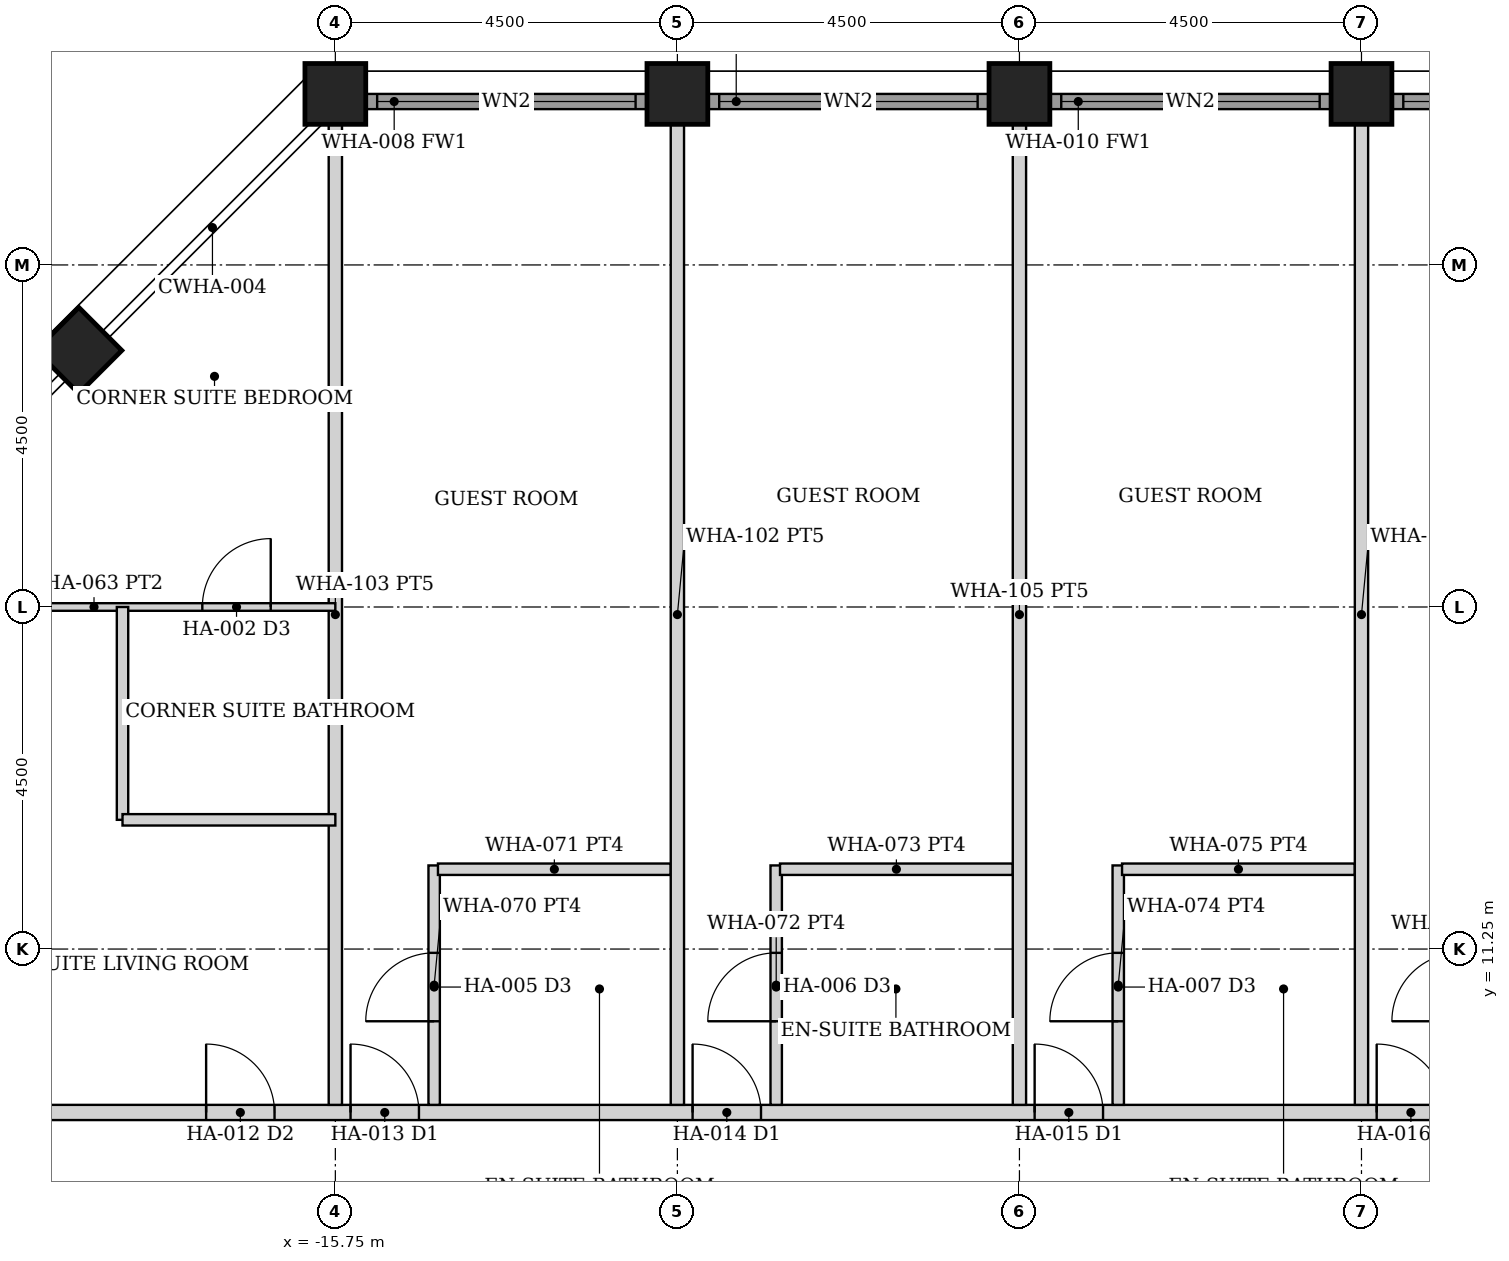
"""IFC4 building model, lengths in metres.
Left out: names, types, materials, properties, quantities, classifications, styles, units other than length and angle.
Written with IfcOpenShell. Run it as: python <this file> out.ifc"""

import sys

from ifc_helpers import new_model, si_unit, direction, frame, frame_2d, origin, origin_2d, place, context, subcontext, project, spatial, rectangle, hollow_rectangle, extrude, element, fill, save


model = new_model("IFC4")
c1 = context("Model", 3, precision=1e-05, world=origin(), true_north=direction((0.0, 1.0)))
c2 = subcontext(c1, "Body", "Model", "MODEL_VIEW")
j1 = project(units=[si_unit("LENGTHUNIT", "METRE"), si_unit("PLANEANGLEUNIT", "RADIAN")], contexts=[c1])
p1 = place(None, origin())
s1 = spatial("IfcSite", under=j1, at=p1, CompositionType="ELEMENT")
p2 = place(p1, origin())
s2 = spatial("IfcBuilding", under=s1, at=p2, CompositionType="ELEMENT")
p3 = place(p2, frame((0.0, 0.0, 118.4)))
s3 = spatial("IfcBuildingStorey", under=s2, at=p3, CompositionType="ELEMENT", Elevation=118.4)
for number, where, z_axis, x_axis in (
    (1, (-15.75, 22.5, 0.0), (0.0, 0.0, 1.0), (0.0, 1.0, 0.0)),
    (2, (-11.25, 22.5, 0.0), (0.0, 0.0, 1.0), (0.0, 1.0, 0.0)),
    (3, (-6.75, 22.5, 0.0), (0.0, 0.0, 1.0), (0.0, 1.0, 0.0)),
    (4, (-2.25, 22.5, 0.0), (0.0, 0.0, 1.0), (0.0, 1.0, 0.0)),
    (5, (-19.125, 19.125, 0.0), (0.0, 0.0, 1.0), (0.707, -0.707, 0.0)),
):
    element("IfcColumn", number, at=place(p3, frame(where, z_axis=z_axis, x_axis=x_axis)), inside=s3, PredefinedType="COLUMN", context=c2, shape_type="SweptSolid", body=[
        extrude(hollow_rectangle(XDim=0.8, YDim=0.8, WallThickness=0.06, at=origin_2d()), origin(), (0.0, 0.0, 1.0), 3.6),
    ])
p4 = place(p3, frame((-15.345, 22.4, 0.0), z_axis=(0.0, 0.0, 1.0), x_axis=(1.0, 0.0, 0.0)))
e6 = element("IfcWall", 6, at=p4, inside=s3, PredefinedType="SOLIDWALL", context=c2, shape_type="SweptSolid", body=[
    extrude(rectangle(XDim=3.69, YDim=0.2, at=frame_2d((1.845, 0.0))), origin(), (0.0, 0.0, 1.0), 2.479),
])
p5 = place(p4, frame((0.145, 0.0, 0.3)))
e7 = element("IfcOpeningElement", 7, at=p5, cuts=e6, PredefinedType="OPENING", context=c2, shape_type="SweptSolid", body=[
    extrude(rectangle(XDim=3.4, YDim=2.029, at=frame_2d((1.7, 1.015))), frame((0.0, 0.11, 0.0), z_axis=(0.0, -1.0, 0.0), x_axis=(1.0, 0.0, 0.0)), (0.0, 0.0, 1.0), 0.22),
])
p6 = place(p3, frame((-10.845, 22.4, 0.0), z_axis=(0.0, 0.0, 1.0), x_axis=(1.0, 0.0, 0.0)))
e8 = element("IfcWall", 8, at=p6, inside=s3, PredefinedType="SOLIDWALL", context=c2, shape_type="SweptSolid", body=[
    extrude(rectangle(XDim=3.69, YDim=0.2, at=frame_2d((1.845, 0.0))), origin(), (0.0, 0.0, 1.0), 2.479),
])
p7 = place(p6, frame((0.145, 0.0, 0.3)))
e9 = element("IfcOpeningElement", 9, at=p7, cuts=e8, PredefinedType="OPENING", context=c2, shape_type="SweptSolid", body=[
    extrude(rectangle(XDim=3.4, YDim=2.029, at=frame_2d((1.7, 1.015))), frame((0.0, 0.11, 0.0), z_axis=(0.0, -1.0, 0.0), x_axis=(1.0, 0.0, 0.0)), (0.0, 0.0, 1.0), 0.22),
])
p8 = place(p3, frame((-6.345, 22.4, 0.0), z_axis=(0.0, 0.0, 1.0), x_axis=(1.0, 0.0, 0.0)))
e10 = element("IfcWall", 10, at=p8, inside=s3, PredefinedType="SOLIDWALL", context=c2, shape_type="SweptSolid", body=[
    extrude(rectangle(XDim=3.69, YDim=0.2, at=frame_2d((1.845, 0.0))), origin(), (0.0, 0.0, 1.0), 2.479),
])
p9 = place(p8, frame((0.145, 0.0, 0.3)))
e11 = element("IfcOpeningElement", 11, at=p9, cuts=e10, PredefinedType="OPENING", context=c2, shape_type="SweptSolid", body=[
    extrude(rectangle(XDim=3.4, YDim=2.029, at=frame_2d((1.7, 1.015))), frame((0.0, 0.11, 0.0), z_axis=(0.0, -1.0, 0.0), x_axis=(1.0, 0.0, 0.0)), (0.0, 0.0, 1.0), 0.22),
])
p10 = place(p3, frame((-1.845, 22.4, 0.0), z_axis=(0.0, 0.0, 1.0), x_axis=(1.0, 0.0, 0.0)))
e12 = element("IfcWall", 12, at=p10, inside=s3, PredefinedType="SOLIDWALL", context=c2, shape_type="SweptSolid", body=[
    extrude(rectangle(XDim=3.69, YDim=0.2, at=frame_2d((1.845, 0.0))), origin(), (0.0, 0.0, 1.0), 2.479),
])
p11 = place(p10, frame((0.145, 0.0, 0.3)))
e13 = element("IfcOpeningElement", 13, at=p11, cuts=e12, PredefinedType="OPENING", context=c2, shape_type="SweptSolid", body=[
    extrude(rectangle(XDim=3.4, YDim=2.029, at=frame_2d((1.7, 1.015))), frame((0.0, 0.11, 0.0), z_axis=(0.0, -1.0, 0.0), x_axis=(1.0, 0.0, 0.0)), (0.0, 0.0, 1.0), 0.22),
])
p12 = place(p3, frame((-22.3, 9.1, 0.0), z_axis=(0.0, 0.0, 1.0), x_axis=(1.0, 0.0, 0.0)))
e14 = element("IfcWall", 14, at=p12, inside=s3, PredefinedType="PARTITIONING", context=c2, shape_type="SweptSolid", body=[
    extrude(rectangle(XDim=44.6, YDim=0.2, at=frame_2d((22.3, 0.0))), origin(), (0.0, 0.0, 1.0), 2.473),
])
p13 = place(p12, frame((6.75, 0.0, 0.0)))
e15 = element("IfcOpeningElement", 15, at=p13, cuts=e14, PredefinedType="OPENING", context=c2, shape_type="SweptSolid", body=[
    extrude(rectangle(XDim=0.9, YDim=2.1, at=frame_2d((0.45, 1.05))), frame((0.0, 0.11, 0.0), z_axis=(0.0, -1.0, 0.0), x_axis=(1.0, 0.0, 0.0)), (0.0, 0.0, 1.0), 0.22),
])
p14 = place(p12, frame((11.25, 0.0, 0.0)))
e16 = element("IfcOpeningElement", 16, at=p14, cuts=e14, PredefinedType="OPENING", context=c2, shape_type="SweptSolid", body=[
    extrude(rectangle(XDim=0.9, YDim=2.1, at=frame_2d((0.45, 1.05))), frame((0.0, 0.11, 0.0), z_axis=(0.0, -1.0, 0.0), x_axis=(1.0, 0.0, 0.0)), (0.0, 0.0, 1.0), 0.22),
])
p15 = place(p12, frame((15.75, 0.0, 0.0)))
e17 = element("IfcOpeningElement", 17, at=p15, cuts=e14, PredefinedType="OPENING", context=c2, shape_type="SweptSolid", body=[
    extrude(rectangle(XDim=0.9, YDim=2.1, at=frame_2d((0.45, 1.05))), frame((0.0, 0.11, 0.0), z_axis=(0.0, -1.0, 0.0), x_axis=(1.0, 0.0, 0.0)), (0.0, 0.0, 1.0), 0.22),
])
p16 = place(p12, frame((20.25, 0.0, 0.0)))
e18 = element("IfcOpeningElement", 18, at=p16, cuts=e14, PredefinedType="OPENING", context=c2, shape_type="SweptSolid", body=[
    extrude(rectangle(XDim=0.9, YDim=2.1, at=frame_2d((0.45, 1.05))), frame((0.0, 0.11, 0.0), z_axis=(0.0, -1.0, 0.0), x_axis=(1.0, 0.0, 0.0)), (0.0, 0.0, 1.0), 0.22),
])
p17 = place(p12, frame((24.75, 0.0, 0.0)))
e19 = element("IfcOpeningElement", 19, at=p17, cuts=e14, PredefinedType="OPENING", context=c2, shape_type="SweptSolid", body=[
    extrude(rectangle(XDim=0.9, YDim=2.1, at=frame_2d((0.45, 1.05))), frame((0.0, 0.11, 0.0), z_axis=(0.0, -1.0, 0.0), x_axis=(1.0, 0.0, 0.0)), (0.0, 0.0, 1.0), 0.22),
])
p18 = place(p12, frame((29.25, 0.0, 0.0)))
e20 = element("IfcOpeningElement", 20, at=p18, cuts=e14, PredefinedType="OPENING", context=c2, shape_type="SweptSolid", body=[
    extrude(rectangle(XDim=0.9, YDim=2.1, at=frame_2d((0.45, 1.05))), frame((0.0, 0.11, 0.0), z_axis=(0.0, -1.0, 0.0), x_axis=(1.0, 0.0, 0.0)), (0.0, 0.0, 1.0), 0.22),
])
p19 = place(p12, frame((33.75, 0.0, 0.0)))
e21 = element("IfcOpeningElement", 21, at=p19, cuts=e14, PredefinedType="OPENING", context=c2, shape_type="SweptSolid", body=[
    extrude(rectangle(XDim=0.9, YDim=2.1, at=frame_2d((0.45, 1.05))), frame((0.0, 0.11, 0.0), z_axis=(0.0, -1.0, 0.0), x_axis=(1.0, 0.0, 0.0)), (0.0, 0.0, 1.0), 0.22),
])
p20 = place(p12, frame((38.85, 0.0, 0.0)))
e22 = element("IfcOpeningElement", 22, at=p20, cuts=e14, PredefinedType="OPENING", context=c2, shape_type="SweptSolid", body=[
    extrude(rectangle(XDim=0.9, YDim=2.1, at=frame_2d((0.45, 1.05))), frame((0.0, 0.11, 0.0), z_axis=(0.0, -1.0, 0.0), x_axis=(1.0, 0.0, 0.0)), (0.0, 0.0, 1.0), 0.22),
])
p21 = place(p12, frame((4.85, 0.0, 0.0)))
e23 = element("IfcOpeningElement", 23, at=p21, cuts=e14, PredefinedType="OPENING", context=c2, shape_type="SweptSolid", body=[
    extrude(rectangle(XDim=0.9, YDim=2.1, at=frame_2d((0.45, 1.05))), frame((0.0, 0.11, 0.0), z_axis=(0.0, -1.0, 0.0), x_axis=(1.0, 0.0, 0.0)), (0.0, 0.0, 1.0), 0.22),
])
p22 = place(p3, frame((-14.45, 9.2, 0.0), z_axis=(0.0, 0.0, 1.0), x_axis=(0.0, 1.0, 0.0)))
e24 = element("IfcWall", 24, at=p22, inside=s3, PredefinedType="PARTITIONING", context=c2, shape_type="SweptSolid", body=[
    extrude(rectangle(XDim=3.15, YDim=0.15, at=frame_2d((1.575, 0.0))), origin(), (0.0, 0.0, 1.0), 2.473),
])
p23 = place(p22, frame((1.1, 0.0, 0.0)))
e25 = element("IfcOpeningElement", 25, at=p23, cuts=e24, PredefinedType="OPENING", context=c2, shape_type="SweptSolid", body=[
    extrude(rectangle(XDim=0.9, YDim=2.1, at=frame_2d((0.45, 1.05))), frame((0.0, 0.085, 0.0), z_axis=(0.0, -1.0, 0.0), x_axis=(1.0, 0.0, 0.0)), (0.0, 0.0, 1.0), 0.17),
])
p24 = place(p3, frame((-14.4, 12.3, 0.0), z_axis=(0.0, 0.0, 1.0), x_axis=(1.0, 0.0, 0.0)))
e26 = element("IfcWall", 26, at=p24, inside=s3, PredefinedType="PARTITIONING", context=c2, shape_type="SweptSolid", body=[
    extrude(rectangle(XDim=3.062, YDim=0.15, at=frame_2d((1.531, 0.0))), origin(), (0.0, 0.0, 1.0), 2.473),
])
p25 = place(p3, frame((-9.95, 9.2, 0.0), z_axis=(0.0, 0.0, 1.0), x_axis=(0.0, 1.0, 0.0)))
e27 = element("IfcWall", 27, at=p25, inside=s3, PredefinedType="PARTITIONING", context=c2, shape_type="SweptSolid", body=[
    extrude(rectangle(XDim=3.15, YDim=0.15, at=frame_2d((1.575, 0.0))), origin(), (0.0, 0.0, 1.0), 2.473),
])
p26 = place(p25, frame((1.1, 0.0, 0.0)))
e28 = element("IfcOpeningElement", 28, at=p26, cuts=e27, PredefinedType="OPENING", context=c2, shape_type="SweptSolid", body=[
    extrude(rectangle(XDim=0.9, YDim=2.1, at=frame_2d((0.45, 1.05))), frame((0.0, 0.085, 0.0), z_axis=(0.0, -1.0, 0.0), x_axis=(1.0, 0.0, 0.0)), (0.0, 0.0, 1.0), 0.17),
])
p27 = place(p3, frame((-9.9, 12.3, 0.0), z_axis=(0.0, 0.0, 1.0), x_axis=(1.0, 0.0, 0.0)))
e29 = element("IfcWall", 29, at=p27, inside=s3, PredefinedType="PARTITIONING", context=c2, shape_type="SweptSolid", body=[
    extrude(rectangle(XDim=3.062, YDim=0.15, at=frame_2d((1.531, 0.0))), origin(), (0.0, 0.0, 1.0), 2.473),
])
p28 = place(p3, frame((-5.45, 9.2, 0.0), z_axis=(0.0, 0.0, 1.0), x_axis=(0.0, 1.0, 0.0)))
e30 = element("IfcWall", 30, at=p28, inside=s3, PredefinedType="PARTITIONING", context=c2, shape_type="SweptSolid", body=[
    extrude(rectangle(XDim=3.15, YDim=0.15, at=frame_2d((1.575, 0.0))), origin(), (0.0, 0.0, 1.0), 2.473),
])
p29 = place(p28, frame((1.1, 0.0, 0.0)))
e31 = element("IfcOpeningElement", 31, at=p29, cuts=e30, PredefinedType="OPENING", context=c2, shape_type="SweptSolid", body=[
    extrude(rectangle(XDim=0.9, YDim=2.1, at=frame_2d((0.45, 1.05))), frame((0.0, 0.085, 0.0), z_axis=(0.0, -1.0, 0.0), x_axis=(1.0, 0.0, 0.0)), (0.0, 0.0, 1.0), 0.17),
])
p30 = place(p3, frame((-5.4, 12.3, 0.0), z_axis=(0.0, 0.0, 1.0), x_axis=(1.0, 0.0, 0.0)))
e32 = element("IfcWall", 32, at=p30, inside=s3, PredefinedType="PARTITIONING", context=c2, shape_type="SweptSolid", body=[
    extrude(rectangle(XDim=3.062, YDim=0.15, at=frame_2d((1.531, 0.0))), origin(), (0.0, 0.0, 1.0), 2.473),
])
for number, where, z_axis, x_axis in (
    (33, (-15.75, 9.2, 0.0), (0.0, 0.0, 1.0), (0.0, 1.0, 0.0)),
    (34, (-11.25, 9.2, 0.0), (0.0, 0.0, 1.0), (0.0, 1.0, 0.0)),
    (35, (-6.75, 9.2, 0.0), (0.0, 0.0, 1.0), (0.0, 1.0, 0.0)),
    (36, (-2.25, 9.2, 0.0), (0.0, 0.0, 1.0), (0.0, 1.0, 0.0)),
):
    element("IfcWall", number, at=place(p3, frame(where, z_axis=z_axis, x_axis=x_axis)), inside=s3, PredefinedType="PARTITIONING", context=c2, shape_type="SweptSolid", body=[
        extrude(rectangle(XDim=12.9, YDim=0.175, at=frame_2d((6.45, 0.0))), origin(), (0.0, 0.0, 1.0), 2.473),
    ])
p31 = place(p3, frame((-22.1, 15.75, 0.0), z_axis=(0.0, 0.0, 1.0), x_axis=(1.0, 0.0, 0.0)))
e37 = element("IfcWall", 37, at=p31, inside=s3, PredefinedType="PARTITIONING", context=c2, shape_type="SweptSolid", body=[
    extrude(rectangle(XDim=6.35, YDim=0.1, at=frame_2d((3.175, 0.0))), origin(), (0.0, 0.0, 1.0), 2.473),
])
p32 = place(p31, frame((1.375, 0.0, 0.0)))
e38 = element("IfcOpeningElement", 38, at=p32, cuts=e37, PredefinedType="OPENING", context=c2, shape_type="SweptSolid", body=[
    extrude(rectangle(XDim=0.85, YDim=2.1, at=frame_2d((0.425, 1.05))), frame((0.0, 0.06, 0.0), z_axis=(0.0, -1.0, 0.0), x_axis=(1.0, 0.0, 0.0)), (0.0, 0.0, 1.0), 0.12),
])
p33 = place(p31, frame((4.6, 0.0, 0.0)))
e39 = element("IfcOpeningElement", 39, at=p33, cuts=e37, PredefinedType="OPENING", context=c2, shape_type="SweptSolid", body=[
    extrude(rectangle(XDim=0.9, YDim=2.1, at=frame_2d((0.45, 1.05))), frame((0.0, 0.06, 0.0), z_axis=(0.0, -1.0, 0.0), x_axis=(1.0, 0.0, 0.0)), (0.0, 0.0, 1.0), 0.12),
])
for number, where, z_axis, x_axis in (
    (40, (-18.55, 12.95, 0.0), (0.0, 0.0, 1.0), (0.0, 1.0, 0.0)),
    (41, (-18.55, 12.95, 0.0), (0.0, 0.0, 1.0), (1.0, 0.0, 0.0)),
):
    element("IfcWall", number, at=place(p3, frame(where, z_axis=z_axis, x_axis=x_axis)), inside=s3, PredefinedType="PARTITIONING", context=c2, shape_type="SweptSolid", body=[
        extrude(rectangle(XDim=2.8, YDim=0.15, at=frame_2d((1.4, 0.0))), origin(), (0.0, 0.0, 1.0), 2.473),
    ])
p34 = place(p5, origin())
e42 = element("IfcWindow", 42, at=p34, inside=s3, PartitioningType="SINGLE_PANEL", PredefinedType="WINDOW", context=c2, shape_type="SweptSolid", body=[
    extrude(rectangle(XDim=3.4, YDim=2.029, at=frame_2d((1.7, 1.015))), frame((0.0, 0.03, 0.0), z_axis=(0.0, -1.0, 0.0), x_axis=(1.0, 0.0, 0.0)), (0.0, 0.0, 1.0), 0.06),
])
fill(e7, e42)
p35 = place(p7, origin())
e43 = element("IfcWindow", 43, at=p35, inside=s3, PartitioningType="SINGLE_PANEL", PredefinedType="WINDOW", context=c2, shape_type="SweptSolid", body=[
    extrude(rectangle(XDim=3.4, YDim=2.029, at=frame_2d((1.7, 1.015))), frame((0.0, 0.03, 0.0), z_axis=(0.0, -1.0, 0.0), x_axis=(1.0, 0.0, 0.0)), (0.0, 0.0, 1.0), 0.06),
])
fill(e9, e43)
p36 = place(p9, origin())
e44 = element("IfcWindow", 44, at=p36, inside=s3, PartitioningType="SINGLE_PANEL", PredefinedType="WINDOW", context=c2, shape_type="SweptSolid", body=[
    extrude(rectangle(XDim=3.4, YDim=2.029, at=frame_2d((1.7, 1.015))), frame((0.0, 0.03, 0.0), z_axis=(0.0, -1.0, 0.0), x_axis=(1.0, 0.0, 0.0)), (0.0, 0.0, 1.0), 0.06),
])
fill(e11, e44)
p37 = place(p11, origin())
e45 = element("IfcWindow", 45, at=p37, inside=s3, PartitioningType="SINGLE_PANEL", PredefinedType="WINDOW", context=c2, shape_type="SweptSolid", body=[
    extrude(rectangle(XDim=3.4, YDim=2.029, at=frame_2d((1.7, 1.015))), frame((0.0, 0.03, 0.0), z_axis=(0.0, -1.0, 0.0), x_axis=(1.0, 0.0, 0.0)), (0.0, 0.0, 1.0), 0.06),
])
fill(e13, e45)
p38 = place(p13, origin())
e46 = element("IfcDoor", 46, at=p38, inside=s3, OperationType="SINGLE_SWING_LEFT", PredefinedType="DOOR", context=c2, shape_type="SweptSolid", body=[
    extrude(rectangle(XDim=0.9, YDim=2.1, at=frame_2d((0.45, 1.05))), frame((0.0, 0.025, 0.0), z_axis=(0.0, -1.0, 0.0), x_axis=(1.0, 0.0, 0.0)), (0.0, 0.0, 1.0), 0.05),
])
fill(e15, e46)
p39 = place(p23, origin())
e47 = element("IfcDoor", 47, at=p39, inside=s3, OperationType="SINGLE_SWING_LEFT", PredefinedType="DOOR", context=c2, shape_type="SweptSolid", body=[
    extrude(rectangle(XDim=0.9, YDim=2.1, at=frame_2d((0.45, 1.05))), frame((0.0, 0.025, 0.0), z_axis=(0.0, -1.0, 0.0), x_axis=(1.0, 0.0, 0.0)), (0.0, 0.0, 1.0), 0.05),
])
fill(e25, e47)
p40 = place(p14, origin())
e48 = element("IfcDoor", 48, at=p40, inside=s3, OperationType="SINGLE_SWING_LEFT", PredefinedType="DOOR", context=c2, shape_type="SweptSolid", body=[
    extrude(rectangle(XDim=0.9, YDim=2.1, at=frame_2d((0.45, 1.05))), frame((0.0, 0.025, 0.0), z_axis=(0.0, -1.0, 0.0), x_axis=(1.0, 0.0, 0.0)), (0.0, 0.0, 1.0), 0.05),
])
fill(e16, e48)
p41 = place(p26, origin())
e49 = element("IfcDoor", 49, at=p41, inside=s3, OperationType="SINGLE_SWING_LEFT", PredefinedType="DOOR", context=c2, shape_type="SweptSolid", body=[
    extrude(rectangle(XDim=0.9, YDim=2.1, at=frame_2d((0.45, 1.05))), frame((0.0, 0.025, 0.0), z_axis=(0.0, -1.0, 0.0), x_axis=(1.0, 0.0, 0.0)), (0.0, 0.0, 1.0), 0.05),
])
fill(e28, e49)
p42 = place(p15, origin())
e50 = element("IfcDoor", 50, at=p42, inside=s3, OperationType="SINGLE_SWING_LEFT", PredefinedType="DOOR", context=c2, shape_type="SweptSolid", body=[
    extrude(rectangle(XDim=0.9, YDim=2.1, at=frame_2d((0.45, 1.05))), frame((0.0, 0.025, 0.0), z_axis=(0.0, -1.0, 0.0), x_axis=(1.0, 0.0, 0.0)), (0.0, 0.0, 1.0), 0.05),
])
fill(e17, e50)
p43 = place(p29, origin())
e51 = element("IfcDoor", 51, at=p43, inside=s3, OperationType="SINGLE_SWING_LEFT", PredefinedType="DOOR", context=c2, shape_type="SweptSolid", body=[
    extrude(rectangle(XDim=0.9, YDim=2.1, at=frame_2d((0.45, 1.05))), frame((0.0, 0.025, 0.0), z_axis=(0.0, -1.0, 0.0), x_axis=(1.0, 0.0, 0.0)), (0.0, 0.0, 1.0), 0.05),
])
fill(e31, e51)
p44 = place(p16, origin())
e52 = element("IfcDoor", 52, at=p44, inside=s3, OperationType="SINGLE_SWING_LEFT", PredefinedType="DOOR", context=c2, shape_type="SweptSolid", body=[
    extrude(rectangle(XDim=0.9, YDim=2.1, at=frame_2d((0.45, 1.05))), frame((0.0, 0.025, 0.0), z_axis=(0.0, -1.0, 0.0), x_axis=(1.0, 0.0, 0.0)), (0.0, 0.0, 1.0), 0.05),
])
fill(e18, e52)
p45 = place(p21, origin())
e53 = element("IfcDoor", 53, at=p45, inside=s3, OperationType="SINGLE_SWING_LEFT", PredefinedType="DOOR", context=c2, shape_type="SweptSolid", body=[
    extrude(rectangle(XDim=0.9, YDim=2.1, at=frame_2d((0.45, 1.05))), frame((0.0, 0.025, 0.0), z_axis=(0.0, -1.0, 0.0), x_axis=(1.0, 0.0, 0.0)), (0.0, 0.0, 1.0), 0.05),
])
fill(e23, e53)
p46 = place(p33, origin())
e54 = element("IfcDoor", 54, at=p46, inside=s3, OperationType="SINGLE_SWING_RIGHT", PredefinedType="DOOR", context=c2, shape_type="SweptSolid", body=[
    extrude(rectangle(XDim=0.9, YDim=2.1, at=frame_2d((0.45, 1.05))), frame((0.0, 0.025, 0.0), z_axis=(0.0, -1.0, 0.0), x_axis=(1.0, 0.0, 0.0)), (0.0, 0.0, 1.0), 0.05),
])
fill(e39, e54)
save(model, sys.argv[1])
